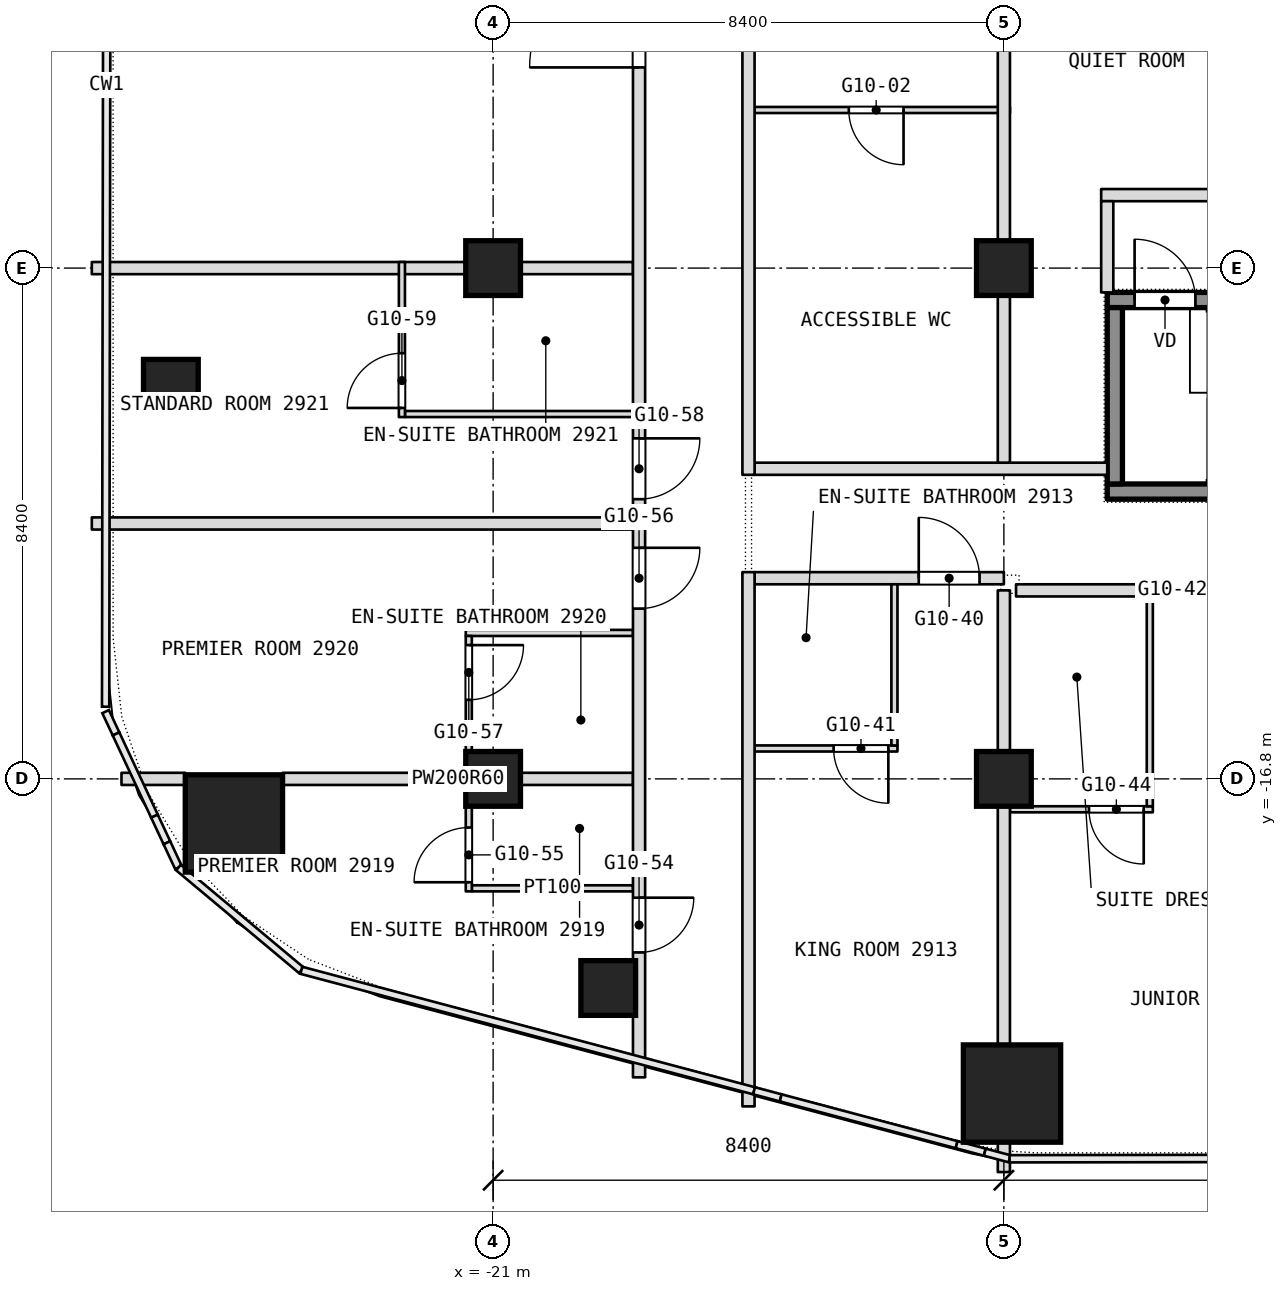
"""IFC4 building model, lengths in metres.
Left out: names, types, materials, properties, quantities, classifications, styles, units other than length and angle.
Written with IfcOpenShell. Run it as: python <this file> out.ifc"""

import sys

from ifc_helpers import new_model, si_unit, direction, frame, frame_2d, origin, origin_2d, place, context, subcontext, project, spatial, rectangle, extrude, element, fill, save


model = new_model("IFC4")
c1 = context("Model", 3, precision=1e-05, world=origin(), true_north=direction((0.0, 1.0)))
c2 = subcontext(c1, "Body", "Model", "MODEL_VIEW")
j1 = project(units=[si_unit("LENGTHUNIT", "METRE"), si_unit("PLANEANGLEUNIT", "RADIAN")], contexts=[c1])
p1 = place(None, origin())
s1 = spatial("IfcSite", under=j1, at=p1, CompositionType="ELEMENT")
p2 = place(p1, origin())
s2 = spatial("IfcBuilding", under=s1, at=p2, CompositionType="ELEMENT")
p3 = place(p2, frame((0.0, 0.0, 130.1)))
s3 = spatial("IfcBuildingStorey", under=s2, at=p3, CompositionType="ELEMENT", Elevation=130.1)
for number, where, z_axis, x_axis in (
    (1, (-25.263, -17.533, 0.0), (0.0, 0.0, 1.0), (1.0, 0.0, 0.0)),
    (2, (-12.466, -21.975, 0.0), (0.0, 0.0, 1.0), (1.0, 0.0, 0.0)),
):
    element("IfcColumn", number, at=place(p3, frame(where, z_axis=z_axis, x_axis=x_axis)), inside=s3, PredefinedType="COLUMN", context=c2, shape_type="SweptSolid", body=[
        extrude(rectangle(XDim=1.6, YDim=1.6, at=origin_2d()), origin(), (0.0, 0.0, 1.0), 3.6),
    ])
for number, where, z_axis, x_axis in (
    (3, (-21.0, -16.8, 0.0), (0.0, 0.0, 1.0), (1.0, 0.0, 0.0)),
    (4, (-21.0, -8.4, 0.0), (0.0, 0.0, 1.0), (1.0, 0.0, 0.0)),
    (5, (-12.6, -16.8, 0.0), (0.0, 0.0, 1.0), (1.0, 0.0, 0.0)),
    (6, (-12.6, -8.4, 0.0), (0.0, 0.0, 1.0), (1.0, 0.0, 0.0)),
    (7, (-26.3, -10.352, 0.0), (0.0, 0.0, 1.0), (1.0, 0.0, 0.0)),
    (8, (-19.107, -20.239, 0.0), (0.0, 0.0, 1.0), (1.0, 0.0, 0.0)),
):
    element("IfcColumn", number, at=place(p3, frame(where, z_axis=z_axis, x_axis=x_axis)), inside=s3, PredefinedType="COLUMN", context=c2, shape_type="SweptSolid", body=[
        extrude(rectangle(XDim=0.9, YDim=0.9, at=origin_2d()), origin(), (0.0, 0.0, 1.0), 3.6),
    ])
p4 = place(p3, frame((-21.35, -18.6, 0.0), z_axis=(0.0, 0.0, 1.0), x_axis=(1.0, 0.0, 0.0)))
e9 = element("IfcWall", 9, at=p4, inside=s3, PredefinedType="PARTITIONING", context=c2, shape_type="SweptSolid", body=[
    extrude(rectangle(XDim=2.65, YDim=0.1, at=frame_2d((1.325, 0.0))), origin(), (0.0, 0.0, 1.0), 3.34),
])
p5 = place(p3, frame((-12.5, -17.3, 0.0), z_axis=(0.0, 0.0, 1.0), x_axis=(1.0, 0.0, 0.0)))
e10 = element("IfcWall", 10, at=p5, inside=s3, PredefinedType="PARTITIONING", context=c2, shape_type="SweptSolid", body=[
    extrude(rectangle(XDim=2.35, YDim=0.1, at=frame_2d((1.175, 0.0))), origin(), (0.0, 0.0, 1.0), 3.34),
])
p6 = place(p5, frame((1.3, 0.0, 0.0)))
e11 = element("IfcOpeningElement", 11, at=p6, cuts=e10, PredefinedType="OPENING", context=c2, shape_type="SweptSolid", body=[
    extrude(rectangle(XDim=0.9, YDim=2.1, at=frame_2d((0.45, 1.05))), frame((0.0, 0.05, 0.0), z_axis=(0.0, -1.0, 0.0), x_axis=(1.0, 0.0, 0.0)), (0.0, 0.0, 1.0), 0.1),
])
p7 = place(p3, frame((-27.112, -16.8, 0.0), z_axis=(0.0, 0.0, 1.0), x_axis=(1.0, 0.0, 0.0)))
e12 = element("IfcWall", 12, at=p7, inside=s3, PredefinedType="PARTITIONING", context=c2, shape_type="SweptSolid", body=[
    extrude(rectangle(XDim=1.049, YDim=0.2, at=frame_2d((0.524, 0.0))), origin(), (0.0, 0.0, 1.0), 3.34),
])
p8 = place(p3, frame((-24.463, -16.8, 0.0), z_axis=(0.0, 0.0, 1.0), x_axis=(1.0, 0.0, 0.0)))
e13 = element("IfcWall", 13, at=p8, inside=s3, PredefinedType="PARTITIONING", context=c2, shape_type="SweptSolid", body=[
    extrude(rectangle(XDim=5.763, YDim=0.2, at=frame_2d((2.881, 0.0))), origin(), (0.0, 0.0, 1.0), 2.89),
])
p9 = place(p3, frame((-16.7, -16.3, 0.0), z_axis=(0.0, 0.0, 1.0), x_axis=(1.0, 0.0, 0.0)))
e14 = element("IfcWall", 14, at=p9, inside=s3, PredefinedType="PARTITIONING", context=c2, shape_type="SweptSolid", body=[
    extrude(rectangle(XDim=2.35, YDim=0.1, at=frame_2d((1.175, 0.0))), origin(), (0.0, 0.0, 1.0), 3.34),
])
p10 = place(p9, frame((1.3, 0.0, 0.0)))
e15 = element("IfcOpeningElement", 15, at=p10, cuts=e14, PredefinedType="OPENING", context=c2, shape_type="SweptSolid", body=[
    extrude(rectangle(XDim=0.9, YDim=2.1, at=frame_2d((0.45, 1.05))), frame((0.0, 0.05, 0.0), z_axis=(0.0, -1.0, 0.0), x_axis=(1.0, 0.0, 0.0)), (0.0, 0.0, 1.0), 0.1),
])
p11 = place(p3, frame((-21.45, -14.4, 0.0), z_axis=(0.0, 0.0, 1.0), x_axis=(1.0, 0.0, 0.0)))
e16 = element("IfcWall", 16, at=p11, inside=s3, PredefinedType="PARTITIONING", context=c2, shape_type="SweptSolid", body=[
    extrude(rectangle(XDim=2.75, YDim=0.1, at=frame_2d((1.375, 0.0))), origin(), (0.0, 0.0, 1.0), 3.34),
])
p12 = place(p3, frame((-12.4, -13.7, 0.0), z_axis=(0.0, 0.0, 1.0), x_axis=(1.0, 0.0, 0.0)))
e17 = element("IfcWall", 17, at=p12, inside=s3, PredefinedType="PARTITIONING", context=c2, shape_type="SweptSolid", body=[
    extrude(rectangle(XDim=9.2, YDim=0.2, at=frame_2d((4.6, 0.0))), origin(), (0.0, 0.0, 1.0), 3.34),
])
p13 = place(p12, frame((3.4, 0.0, 0.0)))
e18 = element("IfcOpeningElement", 18, at=p13, cuts=e17, PredefinedType="OPENING", context=c2, shape_type="SweptSolid", body=[
    extrude(rectangle(XDim=1.1, YDim=2.1, at=frame_2d((0.55, 1.05))), frame((0.0, 0.1, 0.0), z_axis=(0.0, -1.0, 0.0), x_axis=(1.0, 0.0, 0.0)), (0.0, 0.0, 1.0), 0.2),
])
p14 = place(p3, frame((-16.7, -13.5, 0.0), z_axis=(0.0, 0.0, 1.0), x_axis=(1.0, 0.0, 0.0)))
e19 = element("IfcWall", 19, at=p14, inside=s3, PredefinedType="PARTITIONING", context=c2, shape_type="SweptSolid", body=[
    extrude(rectangle(XDim=4.1, YDim=0.2, at=frame_2d((2.05, 0.0))), origin(), (0.0, 0.0, 1.0), 3.34),
])
p15 = place(p14, frame((2.7, 0.0, 0.0)))
e20 = element("IfcOpeningElement", 20, at=p15, cuts=e19, PredefinedType="OPENING", context=c2, shape_type="SweptSolid", body=[
    extrude(rectangle(XDim=1.0, YDim=2.1, at=frame_2d((0.5, 1.05))), frame((0.0, 0.1, 0.0), z_axis=(0.0, -1.0, 0.0), x_axis=(1.0, 0.0, 0.0)), (0.0, 0.0, 1.0), 0.2),
])
p16 = place(p3, frame((-27.6, -12.6, 0.0), z_axis=(0.0, 0.0, 1.0), x_axis=(1.0, 0.0, 0.0)))
e21 = element("IfcWall", 21, at=p16, inside=s3, PredefinedType="PARTITIONING", context=c2, shape_type="SweptSolid", body=[
    extrude(rectangle(XDim=8.9, YDim=0.2, at=frame_2d((4.45, 0.0))), origin(), (0.0, 0.0, 1.0), 3.34),
])
p17 = place(p3, frame((-16.7, -11.7, 0.0), z_axis=(0.0, 0.0, 1.0), x_axis=(1.0, 0.0, 0.0)))
e22 = element("IfcWall", 22, at=p17, inside=s3, PredefinedType="PARTITIONING", context=c2, shape_type="SweptSolid", body=[
    extrude(rectangle(XDim=5.8, YDim=0.2, at=frame_2d((2.9, 0.0))), origin(), (0.0, 0.0, 1.0), 3.34),
])
p18 = place(p3, frame((-22.45, -10.8, 0.0), z_axis=(0.0, 0.0, 1.0), x_axis=(1.0, 0.0, 0.0)))
e23 = element("IfcWall", 23, at=p18, inside=s3, PredefinedType="PARTITIONING", context=c2, shape_type="SweptSolid", body=[
    extrude(rectangle(XDim=3.75, YDim=0.1, at=frame_2d((1.875, 0.0))), origin(), (0.0, 0.0, 1.0), 3.34),
])
p19 = place(p3, frame((-27.6, -8.4, 0.0), z_axis=(0.0, 0.0, 1.0), x_axis=(1.0, 0.0, 0.0)))
e24 = element("IfcWall", 24, at=p19, inside=s3, PredefinedType="PARTITIONING", context=c2, shape_type="SweptSolid", body=[
    extrude(rectangle(XDim=8.9, YDim=0.2, at=frame_2d((4.45, 0.0))), origin(), (0.0, 0.0, 1.0), 2.89),
])
p20 = place(p3, frame((-11.0, -7.2, 0.0), z_axis=(0.0, 0.0, 1.0), x_axis=(1.0, 0.0, 0.0)))
e25 = element("IfcWall", 25, at=p20, inside=s3, PredefinedType="PARTITIONING", context=c2, shape_type="SweptSolid", body=[
    extrude(rectangle(XDim=2.3, YDim=0.2, at=frame_2d((1.15, 0.0))), origin(), (0.0, 0.0, 1.0), 3.34),
])
p21 = place(p3, frame((-16.7, -5.8, 0.0), z_axis=(0.0, 0.0, 1.0), x_axis=(1.0, 0.0, 0.0)))
e26 = element("IfcWall", 26, at=p21, inside=s3, PredefinedType="PARTITIONING", context=c2, shape_type="SweptSolid", body=[
    extrude(rectangle(XDim=4.2, YDim=0.1, at=frame_2d((2.1, 0.0))), origin(), (0.0, 0.0, 1.0), 3.34),
])
p22 = place(p21, frame((1.55, 0.0, 0.0)))
e27 = element("IfcOpeningElement", 27, at=p22, cuts=e26, PredefinedType="OPENING", context=c2, shape_type="SweptSolid", body=[
    extrude(rectangle(XDim=0.9, YDim=2.1, at=frame_2d((0.45, 1.05))), frame((0.0, 0.05, 0.0), z_axis=(0.0, -1.0, 0.0), x_axis=(1.0, 0.0, 0.0)), (0.0, 0.0, 1.0), 0.1),
])
p23 = place(p3, frame((-10.2, -17.25, 0.0), z_axis=(0.0, 0.0, 1.0), x_axis=(0.0, 1.0, 0.0)))
e28 = element("IfcWall", 28, at=p23, inside=s3, PredefinedType="PARTITIONING", context=c2, shape_type="SweptSolid", body=[
    extrude(rectangle(XDim=3.45, YDim=0.1, at=frame_2d((1.725, 0.0))), origin(), (0.0, 0.0, 1.0), 3.34),
])
p24 = place(p3, frame((-10.9, -8.8, 0.0), z_axis=(0.0, 0.0, 1.0), x_axis=(0.0, 1.0, 0.0)))
e29 = element("IfcWall", 29, at=p24, inside=s3, PredefinedType="PARTITIONING", context=c2, shape_type="SweptSolid", body=[
    extrude(rectangle(XDim=1.5, YDim=0.2, at=frame_2d((0.75, 0.0))), origin(), (0.0, 0.0, 1.0), 3.34),
])
p25 = place(p3, frame((-12.6, -23.266, 0.0), z_axis=(0.0, 0.0, 1.0), x_axis=(0.0, 1.0, 0.0)))
e30 = element("IfcWall", 30, at=p25, inside=s3, PredefinedType="PARTITIONING", context=c2, shape_type="SweptSolid", body=[
    extrude(rectangle(XDim=0.491, YDim=0.2, at=frame_2d((0.246, 0.0))), origin(), (0.0, 0.0, 1.0), 3.34),
])
p26 = place(p3, frame((-12.6, -21.175, 0.0), z_axis=(0.0, 0.0, 1.0), x_axis=(0.0, 1.0, 0.0)))
e31 = element("IfcWall", 31, at=p26, inside=s3, PredefinedType="PARTITIONING", context=c2, shape_type="SweptSolid", body=[
    extrude(rectangle(XDim=7.475, YDim=0.2, at=frame_2d((3.738, 0.0))), origin(), (0.0, 0.0, 1.0), 3.34),
])
p27 = place(p3, frame((-12.6, -11.6, 0.0), z_axis=(0.0, 0.0, 1.0), x_axis=(0.0, 1.0, 0.0)))
e32 = element("IfcWall", 32, at=p27, inside=s3, PredefinedType="PARTITIONING", context=c2, shape_type="SweptSolid", body=[
    extrude(rectangle(XDim=9.7, YDim=0.2, at=frame_2d((4.85, 0.0))), origin(), (0.0, 0.0, 1.0), 3.34),
])
p28 = place(p3, frame((-14.4, -16.25, 0.0), z_axis=(0.0, 0.0, 1.0), x_axis=(0.0, 1.0, 0.0)))
e33 = element("IfcWall", 33, at=p28, inside=s3, PredefinedType="PARTITIONING", context=c2, shape_type="SweptSolid", body=[
    extrude(rectangle(XDim=2.65, YDim=0.1, at=frame_2d((1.325, 0.0))), origin(), (0.0, 0.0, 1.0), 3.34),
])
p29 = place(p3, frame((-16.8, -22.186, 0.0), z_axis=(0.0, 0.0, 1.0), x_axis=(0.0, 1.0, 0.0)))
e34 = element("IfcWall", 34, at=p29, inside=s3, PredefinedType="PARTITIONING", context=c2, shape_type="SweptSolid", body=[
    extrude(rectangle(XDim=8.786, YDim=0.2, at=frame_2d((4.393, 0.0))), origin(), (0.0, 0.0, 1.0), 3.34),
])
p30 = place(p3, frame((-16.8, -11.8, 0.0), z_axis=(0.0, 0.0, 1.0), x_axis=(0.0, 1.0, 0.0)))
e35 = element("IfcWall", 35, at=p30, inside=s3, PredefinedType="PARTITIONING", context=c2, shape_type="SweptSolid", body=[
    extrude(rectangle(XDim=9.9, YDim=0.2, at=frame_2d((4.95, 0.0))), origin(), (0.0, 0.0, 1.0), 3.34),
])
p31 = place(p3, frame((-18.6, -21.708, 0.0), z_axis=(0.0, 0.0, 1.0), x_axis=(0.0, 1.0, 0.0)))
e36 = element("IfcWall", 36, at=p31, inside=s3, PredefinedType="PARTITIONING", context=c2, shape_type="SweptSolid", body=[
    extrude(rectangle(XDim=28.608, YDim=0.2, at=frame_2d((14.304, 0.0))), origin(), (0.0, 0.0, 1.0), 3.34),
])
p32 = place(p31, frame((2.054, 0.0, 0.0)))
e37 = element("IfcOpeningElement", 37, at=p32, cuts=e36, PredefinedType="OPENING", context=c2, shape_type="SweptSolid", body=[
    extrude(rectangle(XDim=0.9, YDim=2.1, at=frame_2d((0.45, 1.05))), frame((0.0, 0.1, 0.0), z_axis=(0.0, -1.0, 0.0), x_axis=(1.0, 0.0, 0.0)), (0.0, 0.0, 1.0), 0.2),
])
p33 = place(p31, frame((7.708, 0.0, 0.0)))
e38 = element("IfcOpeningElement", 38, at=p33, cuts=e36, PredefinedType="OPENING", context=c2, shape_type="SweptSolid", body=[
    extrude(rectangle(XDim=1.0, YDim=2.1, at=frame_2d((0.5, 1.05))), frame((0.0, 0.1, 0.0), z_axis=(0.0, -1.0, 0.0), x_axis=(1.0, 0.0, 0.0)), (0.0, 0.0, 1.0), 0.2),
])
p34 = place(p31, frame((9.508, 0.0, 0.0)))
e39 = element("IfcOpeningElement", 39, at=p34, cuts=e36, PredefinedType="OPENING", context=c2, shape_type="SweptSolid", body=[
    extrude(rectangle(XDim=1.0, YDim=2.1, at=frame_2d((0.5, 1.05))), frame((0.0, 0.1, 0.0), z_axis=(0.0, -1.0, 0.0), x_axis=(1.0, 0.0, 0.0)), (0.0, 0.0, 1.0), 0.2),
])
p35 = place(p31, frame((16.608, 0.0, 0.0)))
e40 = element("IfcOpeningElement", 40, at=p35, cuts=e36, PredefinedType="OPENING", context=c2, shape_type="SweptSolid", body=[
    extrude(rectangle(XDim=1.8, YDim=2.1, at=frame_2d((0.9, 1.05))), frame((0.0, 0.1, 0.0), z_axis=(0.0, -1.0, 0.0), x_axis=(1.0, 0.0, 0.0)), (0.0, 0.0, 1.0), 0.2),
])
p36 = place(p3, frame((-21.4, -18.65, 0.0), z_axis=(0.0, 0.0, 1.0), x_axis=(0.0, 1.0, 0.0)))
e41 = element("IfcWall", 41, at=p36, inside=s3, PredefinedType="PARTITIONING", context=c2, shape_type="SweptSolid", body=[
    extrude(rectangle(XDim=4.2, YDim=0.1, at=frame_2d((2.1, 0.0))), origin(), (0.0, 0.0, 1.0), 3.34),
])
p37 = place(p36, frame((0.15, 0.0, 0.0)))
e42 = element("IfcOpeningElement", 42, at=p37, cuts=e41, PredefinedType="OPENING", context=c2, shape_type="SweptSolid", body=[
    extrude(rectangle(XDim=0.9, YDim=2.1, at=frame_2d((0.45, 1.05))), frame((0.0, 0.05, 0.0), z_axis=(0.0, -1.0, 0.0), x_axis=(1.0, 0.0, 0.0)), (0.0, 0.0, 1.0), 0.1),
])
p38 = place(p36, frame((3.15, 0.0, 0.0)))
e43 = element("IfcOpeningElement", 43, at=p38, cuts=e41, PredefinedType="OPENING", context=c2, shape_type="SweptSolid", body=[
    extrude(rectangle(XDim=0.9, YDim=2.1, at=frame_2d((0.45, 1.05))), frame((0.0, 0.05, 0.0), z_axis=(0.0, -1.0, 0.0), x_axis=(1.0, 0.0, 0.0)), (0.0, 0.0, 1.0), 0.1),
])
p39 = place(p3, frame((-22.5, -10.85, 0.0), z_axis=(0.0, 0.0, 1.0), x_axis=(0.0, 1.0, 0.0)))
e44 = element("IfcWall", 44, at=p39, inside=s3, PredefinedType="PARTITIONING", context=c2, shape_type="SweptSolid", body=[
    extrude(rectangle(XDim=2.55, YDim=0.1, at=frame_2d((1.275, 0.0))), origin(), (0.0, 0.0, 1.0), 3.34),
])
p40 = place(p39, frame((0.15, 0.0, 0.0)))
e45 = element("IfcOpeningElement", 45, at=p40, cuts=e44, PredefinedType="OPENING", context=c2, shape_type="SweptSolid", body=[
    extrude(rectangle(XDim=0.9, YDim=2.1, at=frame_2d((0.45, 1.05))), frame((0.0, 0.05, 0.0), z_axis=(0.0, -1.0, 0.0), x_axis=(1.0, 0.0, 0.0)), (0.0, 0.0, 1.0), 0.1),
])
p41 = place(p3, frame((-10.9, -12.075, 0.1), z_axis=(0.0, 0.0, 1.0), x_axis=(1.0, 0.0, 0.0)))
e46 = element("IfcWall", 46, at=p41, inside=s3, PredefinedType="SHEAR", context=c2, shape_type="SweptSolid", body=[
    extrude(rectangle(XDim=6.2, YDim=0.25, at=frame_2d((3.1, 0.0))), origin(), (0.0, 0.0, 1.0), 3.6),
])
p42 = place(p3, frame((-10.9, -8.925, 0.1), z_axis=(0.0, 0.0, 1.0), x_axis=(1.0, 0.0, 0.0)))
e47 = element("IfcWall", 47, at=p42, inside=s3, PredefinedType="SHEAR", context=c2, shape_type="SweptSolid", body=[
    extrude(rectangle(XDim=6.2, YDim=0.25, at=frame_2d((3.1, 0.0))), origin(), (0.0, 0.0, 1.0), 3.6),
])
p43 = place(p42, frame((0.45, 0.0, 0.0)))
e48 = element("IfcOpeningElement", 48, at=p43, cuts=e47, PredefinedType="OPENING", context=c2, shape_type="SweptSolid", body=[
    extrude(rectangle(XDim=1.0, YDim=2.1, at=frame_2d((0.5, 1.05))), frame((0.0, 0.125, 0.0), z_axis=(0.0, -1.0, 0.0), x_axis=(1.0, 0.0, 0.0)), (0.0, 0.0, 1.0), 0.25),
])
p44 = place(p3, frame((-10.775, -11.95, 0.1), z_axis=(0.0, 0.0, 1.0), x_axis=(0.0, 1.0, 0.0)))
e49 = element("IfcWall", 49, at=p44, inside=s3, PredefinedType="SHEAR", context=c2, shape_type="SweptSolid", body=[
    extrude(rectangle(XDim=2.9, YDim=0.25, at=frame_2d((1.45, 0.0))), origin(), (0.0, 0.0, 1.0), 3.6),
])
p45 = place(p6, origin())
e50 = element("IfcDoor", 50, at=p45, inside=s3, OperationType="SINGLE_SWING_RIGHT", PredefinedType="DOOR", context=c2, shape_type="SweptSolid", body=[
    extrude(rectangle(XDim=0.9, YDim=2.1, at=frame_2d((0.45, 1.05))), frame((0.0, 0.025, 0.0), z_axis=(0.0, -1.0, 0.0), x_axis=(1.0, 0.0, 0.0)), (0.0, 0.0, 1.0), 0.05),
])
fill(e11, e50)
p46 = place(p10, origin())
e51 = element("IfcDoor", 51, at=p46, inside=s3, OperationType="SINGLE_SWING_RIGHT", PredefinedType="DOOR", context=c2, shape_type="SweptSolid", body=[
    extrude(rectangle(XDim=0.9, YDim=2.1, at=frame_2d((0.45, 1.05))), frame((0.0, 0.025, 0.0), z_axis=(0.0, -1.0, 0.0), x_axis=(1.0, 0.0, 0.0)), (0.0, 0.0, 1.0), 0.05),
])
fill(e15, e51)
p47 = place(p15, origin())
e52 = element("IfcDoor", 52, at=p47, inside=s3, OperationType="SINGLE_SWING_RIGHT", PredefinedType="DOOR", context=c2, shape_type="SweptSolid", body=[
    extrude(rectangle(XDim=1.0, YDim=2.1, at=frame_2d((0.5, 1.05))), frame((0.0, 0.025, 0.0), z_axis=(0.0, -1.0, 0.0), x_axis=(1.0, 0.0, 0.0)), (0.0, 0.0, 1.0), 0.05),
])
fill(e20, e52)
p48 = place(p22, origin())
e53 = element("IfcDoor", 53, at=p48, inside=s3, OperationType="SINGLE_SWING_RIGHT", PredefinedType="DOOR", context=c2, shape_type="SweptSolid", body=[
    extrude(rectangle(XDim=0.9, YDim=2.1, at=frame_2d((0.45, 1.05))), frame((0.0, 0.025, 0.0), z_axis=(0.0, -1.0, 0.0), x_axis=(1.0, 0.0, 0.0)), (0.0, 0.0, 1.0), 0.05),
])
fill(e27, e53)
p49 = place(p32, origin())
e54 = element("IfcDoor", 54, at=p49, inside=s3, OperationType="SINGLE_SWING_LEFT", PredefinedType="DOOR", context=c2, shape_type="SweptSolid", body=[
    extrude(rectangle(XDim=0.9, YDim=2.1, at=frame_2d((0.45, 1.05))), frame((0.0, 0.025, 0.0), z_axis=(0.0, -1.0, 0.0), x_axis=(1.0, 0.0, 0.0)), (0.0, 0.0, 1.0), 0.05),
])
fill(e37, e54)
p50 = place(p33, origin())
e55 = element("IfcDoor", 55, at=p50, inside=s3, OperationType="SINGLE_SWING_LEFT", PredefinedType="DOOR", context=c2, shape_type="SweptSolid", body=[
    extrude(rectangle(XDim=1.0, YDim=2.1, at=frame_2d((0.5, 1.05))), frame((0.0, 0.025, 0.0), z_axis=(0.0, -1.0, 0.0), x_axis=(1.0, 0.0, 0.0)), (0.0, 0.0, 1.0), 0.05),
])
fill(e38, e55)
p51 = place(p34, origin())
e56 = element("IfcDoor", 56, at=p51, inside=s3, OperationType="SINGLE_SWING_LEFT", PredefinedType="DOOR", context=c2, shape_type="SweptSolid", body=[
    extrude(rectangle(XDim=1.0, YDim=2.1, at=frame_2d((0.5, 1.05))), frame((0.0, 0.025, 0.0), z_axis=(0.0, -1.0, 0.0), x_axis=(1.0, 0.0, 0.0)), (0.0, 0.0, 1.0), 0.05),
])
fill(e39, e56)
p52 = place(p35, origin())
e57 = element("IfcDoor", 57, at=p52, inside=s3, OperationType="DOUBLE_DOOR_SINGLE_SWING", PredefinedType="DOOR", context=c2, shape_type="SweptSolid", body=[
    extrude(rectangle(XDim=1.8, YDim=2.1, at=frame_2d((0.9, 1.05))), frame((0.0, 0.025, 0.0), z_axis=(0.0, -1.0, 0.0), x_axis=(1.0, 0.0, 0.0)), (0.0, 0.0, 1.0), 0.05),
])
fill(e40, e57)
p53 = place(p37, origin())
e58 = element("IfcDoor", 58, at=p53, inside=s3, OperationType="SINGLE_SWING_RIGHT", PredefinedType="DOOR", context=c2, shape_type="SweptSolid", body=[
    extrude(rectangle(XDim=0.9, YDim=2.1, at=frame_2d((0.45, 1.05))), frame((0.0, 0.025, 0.0), z_axis=(0.0, -1.0, 0.0), x_axis=(1.0, 0.0, 0.0)), (0.0, 0.0, 1.0), 0.05),
])
fill(e42, e58)
p54 = place(p38, origin())
e59 = element("IfcDoor", 59, at=p54, inside=s3, OperationType="SINGLE_SWING_LEFT", PredefinedType="DOOR", context=c2, shape_type="SweptSolid", body=[
    extrude(rectangle(XDim=0.9, YDim=2.1, at=frame_2d((0.45, 1.05))), frame((0.0, 0.025, 0.0), z_axis=(0.0, -1.0, 0.0), x_axis=(1.0, 0.0, 0.0)), (0.0, 0.0, 1.0), 0.05),
])
fill(e43, e59)
p55 = place(p40, origin())
e60 = element("IfcDoor", 60, at=p55, inside=s3, OperationType="SINGLE_SWING_RIGHT", PredefinedType="DOOR", context=c2, shape_type="SweptSolid", body=[
    extrude(rectangle(XDim=0.9, YDim=2.1, at=frame_2d((0.45, 1.05))), frame((0.0, 0.025, 0.0), z_axis=(0.0, -1.0, 0.0), x_axis=(1.0, 0.0, 0.0)), (0.0, 0.0, 1.0), 0.05),
])
fill(e45, e60)
p56 = place(p43, origin())
e61 = element("IfcDoor", 61, at=p56, inside=s3, OperationType="SINGLE_SWING_LEFT", PredefinedType="DOOR", context=c2, shape_type="SweptSolid", body=[
    extrude(rectangle(XDim=1.0, YDim=2.1, at=frame_2d((0.5, 1.05))), frame((0.0, 0.025, 0.0), z_axis=(0.0, -1.0, 0.0), x_axis=(1.0, 0.0, 0.0)), (0.0, 0.0, 1.0), 0.05),
])
fill(e48, e61)
save(model, sys.argv[1])
